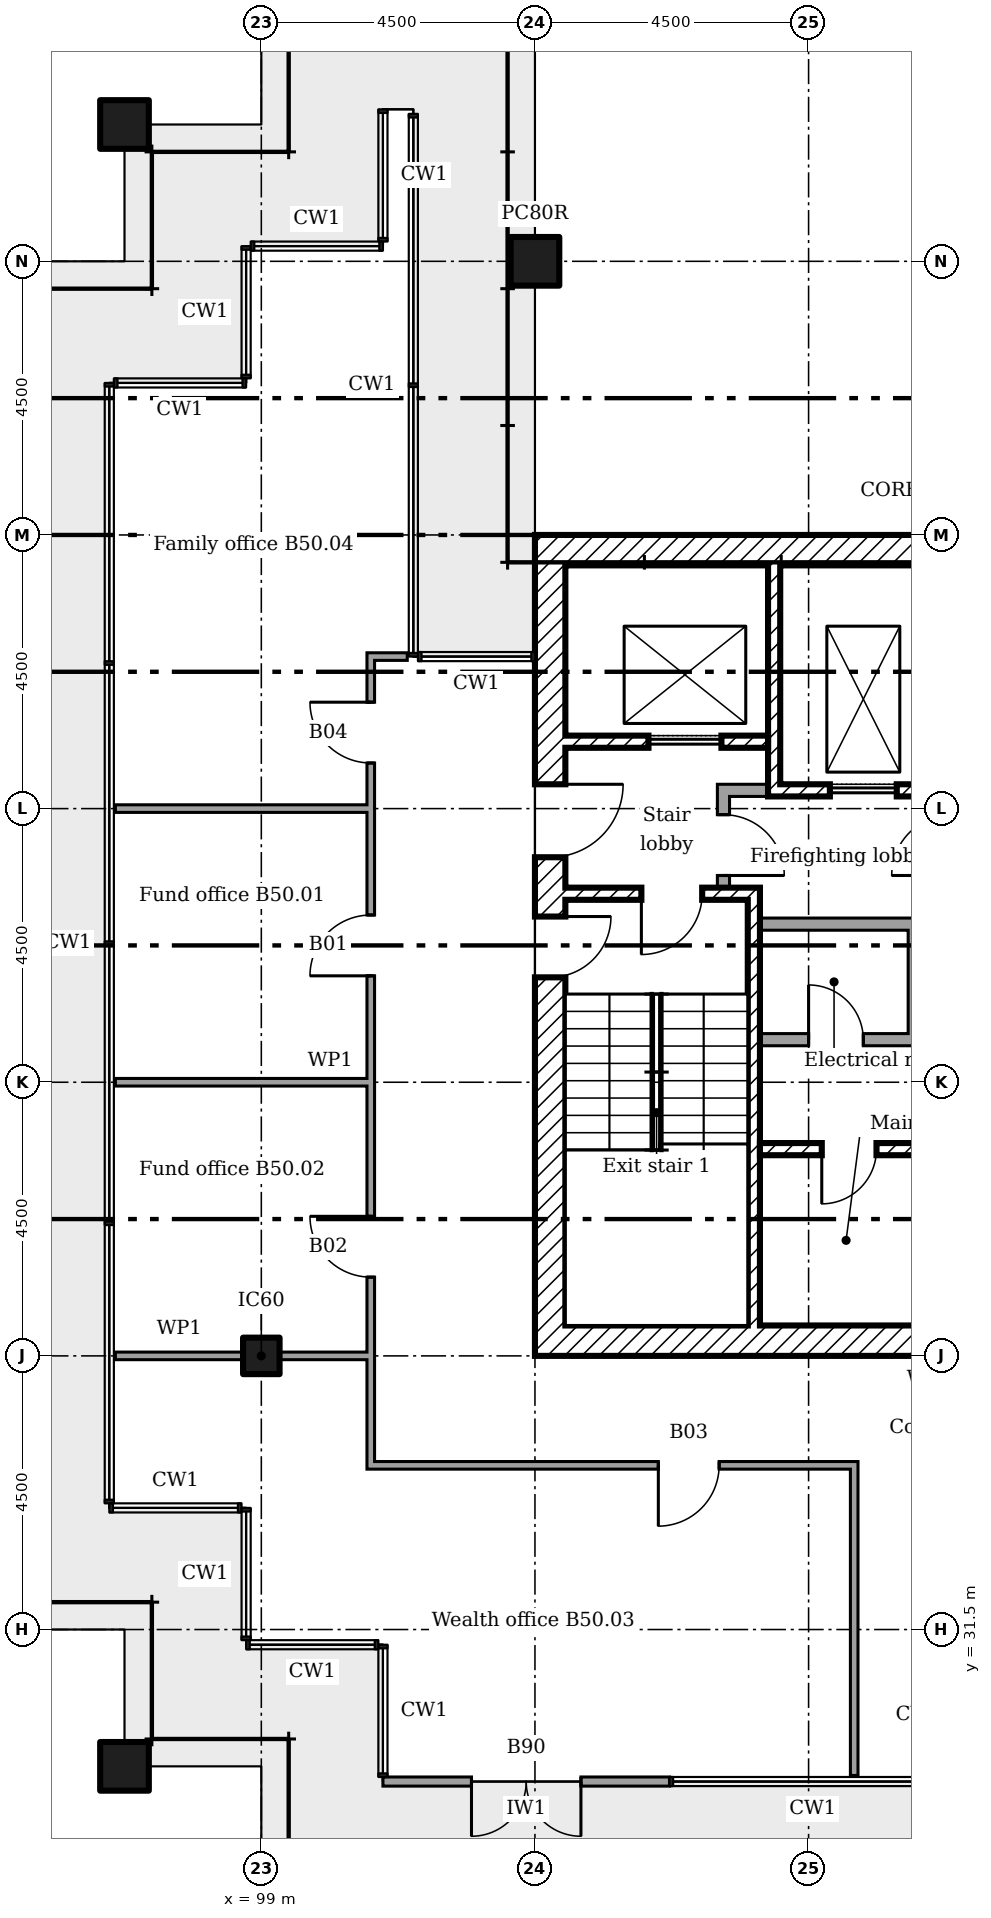
"""IFC4 building model, lengths in metres.
Left out: names, types, materials, properties, quantities, classifications, styles, units other than length and angle.
Written with IfcOpenShell. Run it as: python <this file> out.ifc"""

import sys

from ifc_helpers import new_model, si_unit, direction, frame, frame_2d, origin, origin_2d, place, context, subcontext, project, spatial, rectangle, extrude, element, fill, save


model = new_model("IFC4")
c1 = context("Model", 3, precision=1e-05, world=origin(), true_north=direction((0.0, 1.0)))
c2 = subcontext(c1, "Body", "Model", "MODEL_VIEW")
j1 = project(units=[si_unit("LENGTHUNIT", "METRE"), si_unit("PLANEANGLEUNIT", "RADIAN")], contexts=[c1])
p1 = place(None, origin())
s1 = spatial("IfcSite", under=j1, at=p1, CompositionType="ELEMENT")
p2 = place(p1, origin())
s2 = spatial("IfcBuilding", under=s1, at=p2, CompositionType="ELEMENT")
p3 = place(p2, frame((0.0, 0.0, 199.2)))
s3 = spatial("IfcBuildingStorey", under=s2, at=p3, CompositionType="ELEMENT", Elevation=199.2)
for number, where in (
    (1, (103.5, 54.0, 0.0)),
    (2, (96.75, 56.25, 0.0)),
    (3, (96.75, 29.25, 0.0)),
):
    element("IfcColumn", number, at=place(p3, frame(where)), inside=s3, PredefinedType="COLUMN", context=c2, shape_type="SweptSolid", body=[
        extrude(rectangle(XDim=0.8, YDim=0.8, at=origin_2d()), origin(), (0.0, 0.0, 1.0), 3.6),
    ])
p4 = place(p3, frame((99.0, 36.0, 0.0)))
e4 = element("IfcColumn", 4, at=p4, inside=s3, PredefinedType="COLUMN", context=c2, shape_type="SweptSolid", body=[
    extrude(rectangle(XDim=0.6, YDim=0.6, at=origin_2d()), origin(), (0.0, 0.0, 1.0), 3.6),
])
p5 = place(p3, frame((101.0, 29.0, 0.0)))
e5 = element("IfcWall", 5, at=p5, inside=s3, PredefinedType="SOLIDWALL", context=c2, shape_type="SweptSolid", body=[
    extrude(rectangle(XDim=4.712, YDim=0.15, at=frame_2d((2.356, 0.0))), origin(), (0.0, 0.0, 1.0), 3.45),
])
p6 = place(p5, frame((1.456, 0.0, 0.0)))
e6 = element("IfcOpeningElement", 6, at=p6, cuts=e5, PredefinedType="OPENING", context=c2, shape_type="SweptSolid", body=[
    extrude(rectangle(XDim=1.8, YDim=2.4, at=frame_2d((0.9, 1.2))), frame((0.0, 0.085, 0.0), z_axis=(0.0, -1.0, 0.0), x_axis=(1.0, 0.0, 0.0)), (0.0, 0.0, 1.0), 0.17),
])
for number, where in (
    (7, (103.5, 49.25, 0.0)),
    (8, (103.5, 36.25, 0.0)),
):
    element("IfcWall", number, at=place(p3, frame(where)), inside=s3, PredefinedType="SHEAR", context=c2, shape_type="SweptSolid", body=[
        extrude(rectangle(XDim=13.0, YDim=0.5, at=frame_2d((6.5, 0.0))), origin(), (0.0, 0.0, 1.0), 3.35),
    ])
p7 = place(p3, frame((103.75, 36.5, 0.0), z_axis=(0.0, 0.0, 1.0), x_axis=(0.0, 1.0, 0.0)))
e9 = element("IfcWall", 9, at=p7, inside=s3, PredefinedType="SHEAR", context=c2, shape_type="SweptSolid", body=[
    extrude(rectangle(XDim=12.5, YDim=0.5, at=frame_2d((6.25, 0.0))), origin(), (0.0, 0.0, 1.0), 3.35),
])
p8 = place(p7, frame((7.7, 0.0, 0.0)))
e10 = element("IfcOpeningElement", 10, at=p8, cuts=e9, PredefinedType="OPENING", context=c2, shape_type="SweptSolid", body=[
    extrude(rectangle(XDim=1.2, YDim=2.1, at=frame_2d((0.6, 1.05))), frame((0.0, 0.26, 0.0), z_axis=(0.0, -1.0, 0.0), x_axis=(1.0, 0.0, 0.0)), (0.0, 0.0, 1.0), 0.52),
])
p9 = place(p7, frame((5.725, 0.0, 0.0)))
e11 = element("IfcOpeningElement", 11, at=p9, cuts=e9, PredefinedType="OPENING", context=c2, shape_type="SweptSolid", body=[
    extrude(rectangle(XDim=1.0, YDim=2.1, at=frame_2d((0.5, 1.05))), frame((0.0, 0.26, 0.0), z_axis=(0.0, -1.0, 0.0), x_axis=(1.0, 0.0, 0.0)), (0.0, 0.0, 1.0), 0.52),
])
p10 = place(p3, frame((107.433, 49.0, 0.0), z_axis=(0.0, 0.0, 1.0), x_axis=(0.0, -1.0, 0.0)))
e12 = element("IfcWall", 12, at=p10, inside=s3, PredefinedType="SHEAR", context=c2, shape_type="SweptSolid", body=[
    extrude(rectangle(XDim=3.8, YDim=0.2, at=frame_2d((1.9, 0.0))), origin(), (0.0, 0.0, 1.0), 3.35),
])
p11 = place(p3, frame((106.5, 45.3, 0.0)))
e13 = element("IfcWall", 13, at=p11, inside=s3, PredefinedType="PARTITIONING", context=c2, shape_type="SweptSolid", body=[
    extrude(rectangle(XDim=0.833, YDim=0.2, at=frame_2d((0.417, 0.0))), origin(), (0.0, 0.0, 1.0), 3.35),
])
p12 = place(p3, frame((106.6, 43.7, 0.0), z_axis=(0.0, 0.0, 1.0), x_axis=(0.0, 1.0, 0.0)))
e14 = element("IfcWall", 14, at=p12, inside=s3, PredefinedType="PARTITIONING", context=c2, shape_type="SweptSolid", body=[
    extrude(rectangle(XDim=1.5, YDim=0.2, at=frame_2d((0.75, 0.0))), origin(), (0.0, 0.0, 1.0), 3.35),
])
p13 = place(p12, frame((0.2, 0.0, 0.0)))
e15 = element("IfcOpeningElement", 15, at=p13, cuts=e14, PredefinedType="OPENING", context=c2, shape_type="SweptSolid", body=[
    extrude(rectangle(XDim=1.0, YDim=2.1, at=frame_2d((0.5, 1.05))), frame((0.0, 0.11, 0.0), z_axis=(0.0, -1.0, 0.0), x_axis=(1.0, 0.0, 0.0)), (0.0, 0.0, 1.0), 0.22),
])
p14 = place(p3, frame((104.0, 46.1, 0.0)))
e16 = element("IfcWall", 16, at=p14, inside=s3, PredefinedType="SHEAR", context=c2, shape_type="SweptSolid", body=[
    extrude(rectangle(XDim=3.333, YDim=0.2, at=frame_2d((1.667, 0.0))), origin(), (0.0, 0.0, 1.0), 3.35),
])
p15 = place(p14, frame((1.367, 0.0, 0.0)))
e17 = element("IfcOpeningElement", 17, at=p15, cuts=e16, PredefinedType="OPENING", context=c2, shape_type="SweptSolid", body=[
    extrude(rectangle(XDim=1.2, YDim=2.1, at=frame_2d((0.6, 1.05))), frame((0.0, 0.11, 0.0), z_axis=(0.0, -1.0, 0.0), x_axis=(1.0, 0.0, 0.0)), (0.0, 0.0, 1.0), 0.22),
])
p16 = place(p3, frame((107.533, 45.3, 0.0)))
e18 = element("IfcWall", 18, at=p16, inside=s3, PredefinedType="SHEAR", context=c2, shape_type="SweptSolid", body=[
    extrude(rectangle(XDim=2.733, YDim=0.2, at=frame_2d((1.367, 0.0))), origin(), (0.0, 0.0, 1.0), 3.35),
])
p17 = place(p16, frame((0.817, 0.0, 0.0)))
e19 = element("IfcOpeningElement", 19, at=p17, cuts=e18, PredefinedType="OPENING", context=c2, shape_type="SweptSolid", body=[
    extrude(rectangle(XDim=1.1, YDim=2.1, at=frame_2d((0.55, 1.05))), frame((0.0, 0.11, 0.0), z_axis=(0.0, -1.0, 0.0), x_axis=(1.0, 0.0, 0.0)), (0.0, 0.0, 1.0), 0.22),
])
p18 = place(p3, frame((107.2, 39.4, 0.0)))
e20 = element("IfcWall", 20, at=p18, inside=s3, PredefinedType="SHEAR", context=c2, shape_type="SweptSolid", body=[
    extrude(rectangle(XDim=9.3, YDim=0.2, at=frame_2d((4.65, 0.0))), origin(), (0.0, 0.0, 1.0), 3.35),
])
p19 = place(p18, frame((1.017, 0.0, 0.0)))
e21 = element("IfcOpeningElement", 21, at=p19, cuts=e20, PredefinedType="OPENING", context=c2, shape_type="SweptSolid", body=[
    extrude(rectangle(XDim=0.9, YDim=2.1, at=frame_2d((0.45, 1.05))), frame((0.0, 0.11, 0.0), z_axis=(0.0, -1.0, 0.0), x_axis=(1.0, 0.0, 0.0)), (0.0, 0.0, 1.0), 0.22),
])
p20 = place(p18, frame((3.95, 0.0, 0.0)))
e22 = element("IfcOpeningElement", 22, at=p20, cuts=e20, PredefinedType="OPENING", context=c2, shape_type="SweptSolid", body=[
    extrude(rectangle(XDim=0.9, YDim=2.1, at=frame_2d((0.45, 1.05))), frame((0.0, 0.11, 0.0), z_axis=(0.0, -1.0, 0.0), x_axis=(1.0, 0.0, 0.0)), (0.0, 0.0, 1.0), 0.22),
])
p21 = place(p18, frame((6.883, 0.0, 0.0)))
e23 = element("IfcOpeningElement", 23, at=p21, cuts=e20, PredefinedType="OPENING", context=c2, shape_type="SweptSolid", body=[
    extrude(rectangle(XDim=0.9, YDim=2.1, at=frame_2d((0.45, 1.05))), frame((0.0, 0.11, 0.0), z_axis=(0.0, -1.0, 0.0), x_axis=(1.0, 0.0, 0.0)), (0.0, 0.0, 1.0), 0.22),
])
p22 = place(p3, frame((107.1, 36.5, 0.0), z_axis=(0.0, 0.0, 1.0), x_axis=(0.0, 1.0, 0.0)))
e24 = element("IfcWall", 24, at=p22, inside=s3, PredefinedType="SHEAR", context=c2, shape_type="SweptSolid", body=[
    extrude(rectangle(XDim=7.2, YDim=0.2, at=frame_2d((3.6, 0.0))), origin(), (0.0, 0.0, 1.0), 3.35),
])
p23 = place(p3, frame((104.0, 43.6, 0.0)))
e25 = element("IfcWall", 25, at=p23, inside=s3, PredefinedType="SHEAR", context=c2, shape_type="SweptSolid", body=[
    extrude(rectangle(XDim=3.0, YDim=0.2, at=frame_2d((1.5, 0.0))), origin(), (0.0, 0.0, 1.0), 3.35),
])
p24 = place(p23, frame((1.25, 0.0, 0.0)))
e26 = element("IfcOpeningElement", 26, at=p24, cuts=e25, PredefinedType="OPENING", context=c2, shape_type="SweptSolid", body=[
    extrude(rectangle(XDim=1.0, YDim=2.1, at=frame_2d((0.5, 1.05))), frame((0.0, 0.11, 0.0), z_axis=(0.0, -1.0, 0.0), x_axis=(1.0, 0.0, 0.0)), (0.0, 0.0, 1.0), 0.22),
])
p25 = place(p3, frame((107.2, 43.1, 0.0)))
e27 = element("IfcWall", 27, at=p25, inside=s3, PredefinedType="PARTITIONING", context=c2, shape_type="SweptSolid", body=[
    extrude(rectangle(XDim=6.1, YDim=0.2, at=frame_2d((3.05, 0.0))), origin(), (0.0, 0.0, 1.0), 3.35),
])
p26 = place(p25, frame((4.75, 0.0, 0.0)))
e28 = element("IfcOpeningElement", 28, at=p26, cuts=e27, PredefinedType="OPENING", context=c2, shape_type="SweptSolid", body=[
    extrude(rectangle(XDim=0.9, YDim=2.1, at=frame_2d((0.45, 1.05))), frame((0.0, 0.11, 0.0), z_axis=(0.0, -1.0, 0.0), x_axis=(1.0, 0.0, 0.0)), (0.0, 0.0, 1.0), 0.22),
])
p27 = place(p3, frame((107.2, 41.2, 0.0)))
e29 = element("IfcWall", 29, at=p27, inside=s3, PredefinedType="PARTITIONING", context=c2, shape_type="SweptSolid", body=[
    extrude(rectangle(XDim=6.1, YDim=0.2, at=frame_2d((3.05, 0.0))), origin(), (0.0, 0.0, 1.0), 3.35),
])
p28 = place(p27, frame((0.8, 0.0, 0.0)))
e30 = element("IfcOpeningElement", 30, at=p28, cuts=e29, PredefinedType="OPENING", context=c2, shape_type="SweptSolid", body=[
    extrude(rectangle(XDim=0.9, YDim=2.1, at=frame_2d((0.45, 1.05))), frame((0.0, 0.11, 0.0), z_axis=(0.0, -1.0, 0.0), x_axis=(1.0, 0.0, 0.0)), (0.0, 0.0, 1.0), 0.22),
])
p29 = place(p27, frame((2.95, 0.0, 0.0)))
e31 = element("IfcOpeningElement", 31, at=p29, cuts=e29, PredefinedType="OPENING", context=c2, shape_type="SweptSolid", body=[
    extrude(rectangle(XDim=0.9, YDim=2.1, at=frame_2d((0.45, 1.05))), frame((0.0, 0.11, 0.0), z_axis=(0.0, -1.0, 0.0), x_axis=(1.0, 0.0, 0.0)), (0.0, 0.0, 1.0), 0.22),
])
p30 = place(p3, frame((109.7, 41.3, 0.0), z_axis=(0.0, 0.0, 1.0), x_axis=(0.0, 1.0, 0.0)))
e32 = element("IfcWall", 32, at=p30, inside=s3, PredefinedType="PARTITIONING", context=c2, shape_type="SweptSolid", body=[
    extrude(rectangle(XDim=1.7, YDim=0.125, at=frame_2d((0.85, 0.0))), origin(), (0.0, 0.0, 1.0), 3.35),
])
p31 = place(p3, frame((100.738, 34.2, 0.0)))
e33 = element("IfcWall", 33, at=p31, inside=s3, PredefinedType="PARTITIONING", context=c2, shape_type="SweptSolid", body=[
    extrude(rectangle(XDim=8.075, YDim=0.125, at=frame_2d((4.038, 0.0))), origin(), (0.0, 0.0, 1.0), 3.45),
])
p32 = place(p31, frame((4.792, 0.0, 0.0)))
e34 = element("IfcOpeningElement", 34, at=p32, cuts=e33, PredefinedType="OPENING", context=c2, shape_type="SweptSolid", body=[
    extrude(rectangle(XDim=1.0, YDim=2.1, at=frame_2d((0.5, 1.05))), frame((0.0, 0.073, 0.0), z_axis=(0.0, -1.0, 0.0), x_axis=(1.0, 0.0, 0.0)), (0.0, 0.0, 1.0), 0.145),
])
p33 = place(p3, frame((96.6, 36.0, 0.0)))
e35 = element("IfcWall", 35, at=p33, inside=s3, PredefinedType="PARTITIONING", context=c2, shape_type="SweptSolid", body=[
    extrude(rectangle(XDim=2.1, YDim=0.125, at=frame_2d((1.05, 0.0))), origin(), (0.0, 0.0, 1.0), 2.842),
])
p34 = place(p3, frame((99.3, 36.0, 0.0)))
e36 = element("IfcWall", 36, at=p34, inside=s3, PredefinedType="PARTITIONING", context=c2, shape_type="SweptSolid", body=[
    extrude(rectangle(XDim=1.5, YDim=0.125, at=frame_2d((0.75, 0.0))), origin(), (0.0, 0.0, 1.0), 2.842),
])
for number, where in (
    (37, (96.6, 40.5, 0.0)),
    (38, (96.6, 45.0, 0.0)),
):
    element("IfcWall", number, at=place(p3, frame(where)), inside=s3, PredefinedType="PARTITIONING", context=c2, shape_type="SweptSolid", body=[
        extrude(rectangle(XDim=4.2, YDim=0.125, at=frame_2d((2.1, 0.0))), origin(), (0.0, 0.0, 1.0), 2.851),
    ])
p35 = place(p3, frame((100.738, 47.5, 0.0)))
e39 = element("IfcWall", 39, at=p35, inside=s3, PredefinedType="PARTITIONING", context=c2, shape_type="SweptSolid", body=[
    extrude(rectangle(XDim=0.662, YDim=0.125, at=frame_2d((0.331, 0.0))), origin(), (0.0, 0.0, 1.0), 3.45),
])
p36 = place(p3, frame((100.8, 34.262, 0.0), z_axis=(0.0, 0.0, 1.0), x_axis=(0.0, 1.0, 0.0)))
e40 = element("IfcWall", 40, at=p36, inside=s3, PredefinedType="PARTITIONING", context=c2, shape_type="SweptSolid", body=[
    extrude(rectangle(XDim=13.175, YDim=0.125, at=frame_2d((6.587, 0.0))), origin(), (0.0, 0.0, 1.0), 3.45),
])
p37 = place(p36, frame((7.988, 0.0, 0.0)))
e41 = element("IfcOpeningElement", 41, at=p37, cuts=e40, PredefinedType="OPENING", context=c2, shape_type="SweptSolid", body=[
    extrude(rectangle(XDim=1.0, YDim=2.1, at=frame_2d((0.5, 1.05))), frame((0.0, 0.073, 0.0), z_axis=(0.0, -1.0, 0.0), x_axis=(1.0, 0.0, 0.0)), (0.0, 0.0, 1.0), 0.145),
])
p38 = place(p36, frame((3.032, 0.0, 0.0)))
e42 = element("IfcOpeningElement", 42, at=p38, cuts=e40, PredefinedType="OPENING", context=c2, shape_type="SweptSolid", body=[
    extrude(rectangle(XDim=1.0, YDim=2.1, at=frame_2d((0.5, 1.05))), frame((0.0, 0.073, 0.0), z_axis=(0.0, -1.0, 0.0), x_axis=(1.0, 0.0, 0.0)), (0.0, 0.0, 1.0), 0.145),
])
p39 = place(p36, frame((11.488, 0.0, 0.0)))
e43 = element("IfcOpeningElement", 43, at=p39, cuts=e40, PredefinedType="OPENING", context=c2, shape_type="SweptSolid", body=[
    extrude(rectangle(XDim=1.0, YDim=2.1, at=frame_2d((0.5, 1.05))), frame((0.0, 0.073, 0.0), z_axis=(0.0, -1.0, 0.0), x_axis=(1.0, 0.0, 0.0)), (0.0, 0.0, 1.0), 0.145),
])
p40 = place(p3, frame((108.75, 29.1, 0.0), z_axis=(0.0, 0.0, 1.0), x_axis=(0.0, 1.0, 0.0)))
e44 = element("IfcWall", 44, at=p40, inside=s3, PredefinedType="PARTITIONING", context=c2, shape_type="SweptSolid", body=[
    extrude(rectangle(XDim=5.037, YDim=0.125, at=frame_2d((2.519, 0.0))), origin(), (0.0, 0.0, 1.0), 3.45),
])
p41 = place(p6, frame((1.8, 0.0, 0.0), x_axis=(-1.0, 0.0, 0.0)))
e45 = element("IfcDoor", 45, at=p41, inside=s3, OperationType="DOUBLE_DOOR_DOUBLE_SWING", PredefinedType="NOTDEFINED", context=c2, shape_type="SweptSolid", body=[
    extrude(rectangle(XDim=1.8, YDim=2.4, at=frame_2d((0.9, 1.2))), frame((0.0, 0.025, 0.0), z_axis=(0.0, -1.0, 0.0), x_axis=(1.0, 0.0, 0.0)), (0.0, 0.0, 1.0), 0.05),
])
fill(e6, e45)
p42 = place(p8, frame((1.2, 0.0, 0.0), x_axis=(-1.0, 0.0, 0.0)))
e46 = element("IfcDoor", 46, at=p42, inside=s3, OperationType="SINGLE_SWING_RIGHT", PredefinedType="DOOR", context=c2, shape_type="SweptSolid", body=[
    extrude(rectangle(XDim=1.2, YDim=2.1, at=frame_2d((0.6, 1.05))), frame((0.0, 0.025, 0.0), z_axis=(0.0, -1.0, 0.0), x_axis=(1.0, 0.0, 0.0)), (0.0, 0.0, 1.0), 0.05),
])
fill(e10, e46)
p43 = place(p24, frame((1.0, 0.0, 0.0), x_axis=(-1.0, 0.0, 0.0)))
e47 = element("IfcDoor", 47, at=p43, inside=s3, OperationType="SINGLE_SWING_LEFT", PredefinedType="DOOR", context=c2, shape_type="SweptSolid", body=[
    extrude(rectangle(XDim=1.0, YDim=2.1, at=frame_2d((0.5, 1.05))), frame((0.0, 0.025, 0.0), z_axis=(0.0, -1.0, 0.0), x_axis=(1.0, 0.0, 0.0)), (0.0, 0.0, 1.0), 0.05),
])
fill(e26, e47)
p44 = place(p9, frame((1.0, 0.0, 0.0), x_axis=(-1.0, 0.0, 0.0)))
e48 = element("IfcDoor", 48, at=p44, inside=s3, OperationType="SINGLE_SWING_RIGHT", PredefinedType="DOOR", context=c2, shape_type="SweptSolid", body=[
    extrude(rectangle(XDim=1.0, YDim=2.1, at=frame_2d((0.5, 1.05))), frame((0.0, 0.025, 0.0), z_axis=(0.0, -1.0, 0.0), x_axis=(1.0, 0.0, 0.0)), (0.0, 0.0, 1.0), 0.05),
])
fill(e11, e48)
p45 = place(p13, frame((1.0, 0.0, 0.0), x_axis=(-1.0, 0.0, 0.0)))
e49 = element("IfcDoor", 49, at=p45, inside=s3, OperationType="SINGLE_SWING_LEFT", PredefinedType="DOOR", context=c2, shape_type="SweptSolid", body=[
    extrude(rectangle(XDim=1.0, YDim=2.1, at=frame_2d((0.5, 1.05))), frame((0.0, 0.025, 0.0), z_axis=(0.0, -1.0, 0.0), x_axis=(1.0, 0.0, 0.0)), (0.0, 0.0, 1.0), 0.05),
])
fill(e15, e49)
p46 = place(p19, frame((0.9, 0.0, 0.0), x_axis=(-1.0, 0.0, 0.0)))
e50 = element("IfcDoor", 50, at=p46, inside=s3, OperationType="SINGLE_SWING_LEFT", PredefinedType="DOOR", context=c2, shape_type="SweptSolid", body=[
    extrude(rectangle(XDim=0.9, YDim=2.1, at=frame_2d((0.45, 1.05))), frame((0.0, 0.025, 0.0), z_axis=(0.0, -1.0, 0.0), x_axis=(1.0, 0.0, 0.0)), (0.0, 0.0, 1.0), 0.05),
])
fill(e21, e50)
p47 = place(p28, origin())
e51 = element("IfcDoor", 51, at=p47, inside=s3, OperationType="SINGLE_SWING_RIGHT", PredefinedType="DOOR", context=c2, shape_type="SweptSolid", body=[
    extrude(rectangle(XDim=0.9, YDim=2.1, at=frame_2d((0.45, 1.05))), frame((0.0, 0.025, 0.0), z_axis=(0.0, -1.0, 0.0), x_axis=(1.0, 0.0, 0.0)), (0.0, 0.0, 1.0), 0.05),
])
fill(e30, e51)
p48 = place(p17, origin())
e52 = element("IfcDoor", 52, at=p48, inside=s3, OperationType="SLIDING_TO_LEFT", PredefinedType="DOOR", context=c2, shape_type="SweptSolid", body=[
    extrude(rectangle(XDim=1.1, YDim=2.1, at=frame_2d((0.55, 1.05))), frame((0.0, 0.025, 0.0), z_axis=(0.0, -1.0, 0.0), x_axis=(1.0, 0.0, 0.0)), (0.0, 0.0, 1.0), 0.05),
])
fill(e19, e52)
p49 = place(p15, origin())
e53 = element("IfcDoor", 53, at=p49, inside=s3, OperationType="SLIDING_TO_LEFT", PredefinedType="DOOR", context=c2, shape_type="SweptSolid", body=[
    extrude(rectangle(XDim=1.2, YDim=2.1, at=frame_2d((0.6, 1.05))), frame((0.0, 0.025, 0.0), z_axis=(0.0, -1.0, 0.0), x_axis=(1.0, 0.0, 0.0)), (0.0, 0.0, 1.0), 0.05),
])
fill(e17, e53)
p50 = place(p37, origin())
e54 = element("IfcDoor", 54, at=p50, inside=s3, OperationType="SINGLE_SWING_RIGHT", PredefinedType="DOOR", context=c2, shape_type="SweptSolid", body=[
    extrude(rectangle(XDim=1.0, YDim=2.1, at=frame_2d((0.5, 1.05))), frame((0.0, 0.025, 0.0), z_axis=(0.0, -1.0, 0.0), x_axis=(1.0, 0.0, 0.0)), (0.0, 0.0, 1.0), 0.05),
])
fill(e41, e54)
p51 = place(p38, origin())
e55 = element("IfcDoor", 55, at=p51, inside=s3, OperationType="SINGLE_SWING_LEFT", PredefinedType="DOOR", context=c2, shape_type="SweptSolid", body=[
    extrude(rectangle(XDim=1.0, YDim=2.1, at=frame_2d((0.5, 1.05))), frame((0.0, 0.025, 0.0), z_axis=(0.0, -1.0, 0.0), x_axis=(1.0, 0.0, 0.0)), (0.0, 0.0, 1.0), 0.05),
])
fill(e42, e55)
p52 = place(p32, frame((1.0, 0.0, 0.0), x_axis=(-1.0, 0.0, 0.0)))
e56 = element("IfcDoor", 56, at=p52, inside=s3, OperationType="SINGLE_SWING_LEFT", PredefinedType="DOOR", context=c2, shape_type="SweptSolid", body=[
    extrude(rectangle(XDim=1.0, YDim=2.1, at=frame_2d((0.5, 1.05))), frame((0.0, 0.025, 0.0), z_axis=(0.0, -1.0, 0.0), x_axis=(1.0, 0.0, 0.0)), (0.0, 0.0, 1.0), 0.05),
])
fill(e34, e56)
p53 = place(p39, origin())
e57 = element("IfcDoor", 57, at=p53, inside=s3, OperationType="SINGLE_SWING_LEFT", PredefinedType="DOOR", context=c2, shape_type="SweptSolid", body=[
    extrude(rectangle(XDim=1.0, YDim=2.1, at=frame_2d((0.5, 1.05))), frame((0.0, 0.025, 0.0), z_axis=(0.0, -1.0, 0.0), x_axis=(1.0, 0.0, 0.0)), (0.0, 0.0, 1.0), 0.05),
])
fill(e43, e57)
save(model, sys.argv[1])
